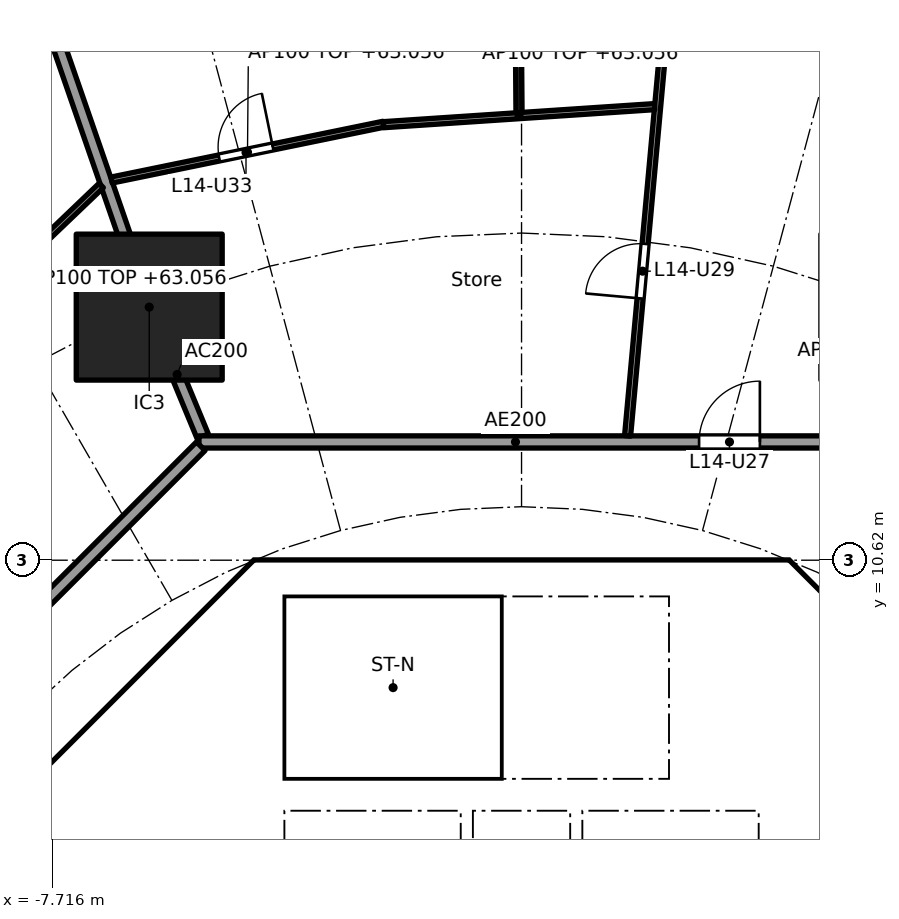
"""IFC4 building model, lengths in metres.
Left out: names, types, materials, properties, quantities, classifications, styles, units other than length and angle.
Written with IfcOpenShell. Run it as: python <this file> out.ifc"""

import sys

from ifc_helpers import new_model, si_unit, direction, frame, frame_2d, origin, origin_2d, place, context, subcontext, project, spatial, polyline, rectangle, outline, extrude, element, fill, save


model = new_model("IFC4")
c1 = context("Model", 3, precision=1e-05, world=origin(), true_north=direction((0.0, 1.0)))
c2 = subcontext(c1, "Body", "Model", "MODEL_VIEW")
j1 = project(units=[si_unit("LENGTHUNIT", "METRE"), si_unit("PLANEANGLEUNIT", "RADIAN")], contexts=[c1])
p1 = place(None, origin())
s1 = spatial("IfcSite", under=j1, at=p1, CompositionType="ELEMENT")
p2 = place(p1, origin())
s2 = spatial("IfcBuilding", under=s1, at=p2, CompositionType="ELEMENT")
p3 = place(p2, frame((0.0, 0.0, 60.3)))
s3 = spatial("IfcBuildingStorey", under=s2, at=p3, CompositionType="ELEMENT", Elevation=60.3)
p4 = place(p3, frame((-6.123, 14.782, 0.0), z_axis=(0.0, 0.0, 1.0), x_axis=(1.0, 0.0, 0.0)))
e1 = element("IfcColumn", 1, at=p4, inside=s3, PredefinedType="COLUMN", context=c2, shape_type="SweptSolid", body=[
    extrude(rectangle(XDim=2.4, YDim=2.4, at=origin_2d()), origin(), (0.0, 0.0, 1.0), 3.7),
])
p5 = place(p3, frame((9.988, 4.613, 0.0), z_axis=(0.0, 0.0, 1.0), x_axis=(-0.707106781187, 0.707106781187, 0.0)))
e2 = element("IfcWall", 2, at=p5, inside=s3, PredefinedType="SHEAR", context=c2, shape_type="SweptSolid", body=[
    extrude(rectangle(XDim=7.602, YDim=0.6, at=frame_2d((3.801, 0.0))), origin(), (0.0, 0.0, 1.0), 3.44),
])
p6 = place(p5, frame((3.201, 0.0, 0.0)))
e3 = element("IfcOpeningElement", 3, at=p6, cuts=e2, PredefinedType="OPENING", context=c2, shape_type="SweptSolid", body=[
    extrude(rectangle(XDim=1.2, YDim=2.1, at=frame_2d((0.6, 1.05))), frame((0.0, 0.31, 0.0), z_axis=(0.0, -1.0, 0.0), x_axis=(1.0, 0.0, 0.0)), (0.0, 0.0, 1.0), 0.62),
])
p7 = place(p3, frame((-4.613, 9.988, 0.0), z_axis=(0.0, 0.0, 1.0), x_axis=(-0.707106781187, -0.707106781187, 0.0)))
e4 = element("IfcWall", 4, at=p7, inside=s3, PredefinedType="SHEAR", context=c2, shape_type="SweptSolid", body=[
    extrude(rectangle(XDim=7.602, YDim=0.6, at=frame_2d((3.801, 0.0))), origin(), (0.0, 0.0, 1.0), 3.44),
])
p8 = place(p7, frame((0.351, 0.0, 0.0)))
e5 = element("IfcOpeningElement", 5, at=p8, cuts=e4, PredefinedType="OPENING", context=c2, shape_type="SweptSolid", body=[
    extrude(rectangle(XDim=1.1, YDim=2.1, at=frame_2d((0.55, 1.05))), frame((0.0, 0.31, 0.0), z_axis=(0.0, -1.0, 0.0), x_axis=(1.0, 0.0, 0.0)), (0.0, 0.0, 1.0), 0.62),
])
p9 = place(p3, frame((-5.8, 4.3, 0.0), z_axis=(0.0, 0.0, 1.0), x_axis=(0.0, 1.0, 0.0)))
e6 = element("IfcWall", 6, at=p9, inside=s3, PredefinedType="PARTITIONING", context=c2, shape_type="SweptSolid", body=[
    extrude(rectangle(XDim=3.927, YDim=0.15, at=frame_2d((1.963, 0.0))), origin(), (0.0, 0.0, 1.0), 3.44),
])
p10 = place(p9, frame((0.413, 0.0, 0.0)))
e7 = element("IfcOpeningElement", 7, at=p10, cuts=e6, PredefinedType="OPENING", context=c2, shape_type="SweptSolid", body=[
    extrude(rectangle(XDim=0.9, YDim=2.1, at=frame_2d((0.45, 1.05))), frame((0.0, 0.085, 0.0), z_axis=(0.0, -1.0, 0.0), x_axis=(1.0, 0.0, 0.0)), (0.0, 0.0, 1.0), 0.17),
])
p11 = place(p9, frame((2.489, 0.0, 0.0)))
e8 = element("IfcOpeningElement", 8, at=p11, cuts=e6, PredefinedType="OPENING", context=c2, shape_type="SweptSolid", body=[
    extrude(rectangle(XDim=0.9, YDim=2.1, at=frame_2d((0.45, 1.05))), frame((0.0, 0.085, 0.0), z_axis=(0.0, -1.0, 0.0), x_axis=(1.0, 0.0, 0.0)), (0.0, 0.0, 1.0), 0.17),
])
p12 = place(p3, frame((4.0, 4.3, 0.0), z_axis=(0.0, 0.0, 1.0), x_axis=(0.0, 1.0, 0.0)))
e9 = element("IfcWall", 9, at=p12, inside=s3, PredefinedType="SOLIDWALL", context=c2, shape_type="SweptSolid", body=[
    extrude(rectangle(XDim=2.2, YDim=0.2, at=frame_2d((1.1, 0.0))), origin(), (0.0, 0.0, 1.0), 3.44),
])
p13 = place(p12, frame((0.55, 0.0, 0.0)))
e10 = element("IfcOpeningElement", 10, at=p13, cuts=e9, PredefinedType="OPENING", context=c2, shape_type="SweptSolid", body=[
    extrude(rectangle(XDim=1.1, YDim=2.1, at=frame_2d((0.55, 1.05))), frame((0.0, 0.11, 0.0), z_axis=(0.0, -1.0, 0.0), x_axis=(1.0, 0.0, 0.0)), (0.0, 0.0, 1.0), 0.22),
])
p14 = place(p3, frame((-4.0, 4.3, 0.0), z_axis=(0.0, 0.0, 1.0), x_axis=(0.0, 1.0, 0.0)))
e11 = element("IfcWall", 11, at=p14, inside=s3, PredefinedType="SOLIDWALL", context=c2, shape_type="SweptSolid", body=[
    extrude(rectangle(XDim=2.2, YDim=0.2, at=frame_2d((1.1, 0.0))), origin(), (0.0, 0.0, 1.0), 3.44),
])
p15 = place(p14, frame((0.55, 0.0, 0.0)))
e12 = element("IfcOpeningElement", 12, at=p15, cuts=e11, PredefinedType="OPENING", context=c2, shape_type="SweptSolid", body=[
    extrude(rectangle(XDim=1.1, YDim=2.1, at=frame_2d((0.55, 1.05))), frame((0.0, 0.11, 0.0), z_axis=(0.0, -1.0, 0.0), x_axis=(1.0, 0.0, 0.0)), (0.0, 0.0, 1.0), 0.22),
])
p16 = place(p3, frame((4.0, 7.025, 0.0), z_axis=(0.0, 0.0, 1.0), x_axis=(0.0, 1.0, 0.0)))
e13 = element("IfcWall", 13, at=p16, inside=s3, PredefinedType="SOLIDWALL", context=c2, shape_type="SweptSolid", body=[
    extrude(rectangle(XDim=3.0, YDim=0.2, at=frame_2d((1.5, 0.0))), origin(), (0.0, 0.0, 1.0), 3.44),
])
p17 = place(p16, frame((0.925, 0.0, 0.0)))
e14 = element("IfcOpeningElement", 14, at=p17, cuts=e13, PredefinedType="OPENING", context=c2, shape_type="SweptSolid", body=[
    extrude(rectangle(XDim=1.1, YDim=2.1, at=frame_2d((0.55, 1.05))), frame((0.0, 0.11, 0.0), z_axis=(0.0, -1.0, 0.0), x_axis=(1.0, 0.0, 0.0)), (0.0, 0.0, 1.0), 0.22),
])
p18 = place(p3, origin())
e15 = element("IfcWall", 15, at=p18, inside=s3, PredefinedType="SHEAR", context=c2, shape_type="SweptSolid", body=[
    extrude(outline(polyline([(-4.152, 10.025), (-4.401, 9.776), (-4.825, 10.2), (-4.401, 10.625), (4.401, 10.625), (4.825, 10.2), (4.401, 9.776), (4.152, 10.025), (-4.152, 10.025)])), origin(), (0.0, 0.0, 1.0), 3.44),
])
p19 = place(p3, frame((-8.001, 6.1, 0.0), z_axis=(0.0, 0.0, 1.0), x_axis=(1.0, 0.0, 0.0)))
e16 = element("IfcWall", 16, at=p19, inside=s3, PredefinedType="PARTITIONING", context=c2, shape_type="SweptSolid", body=[
    extrude(rectangle(XDim=2.126, YDim=0.15, at=frame_2d((1.063, 0.0))), origin(), (0.0, 0.0, 1.0), 3.44),
])
for number, where, z_axis, x_axis in (
    (17, (-0.9, 4.3, 0.0), (0.0, 0.0, 1.0), (0.0, 1.0, 0.0)),
    (18, (0.9, 4.3, 0.0), (0.0, 0.0, 1.0), (0.0, 1.0, 0.0)),
):
    element("IfcWall", number, at=place(p3, frame(where, z_axis=z_axis, x_axis=x_axis)), inside=s3, PredefinedType="SOLIDWALL", context=c2, shape_type="SweptSolid", body=[
        extrude(rectangle(XDim=2.2, YDim=0.2, at=frame_2d((1.1, 0.0))), origin(), (0.0, 0.0, 1.0), 3.44),
    ])
p20 = place(p3, origin())
e19 = element("IfcWall", 19, at=p20, inside=s3, PredefinedType="SOLIDWALL", context=c2, shape_type="SweptSolid", body=[
    extrude(outline(polyline([(-3.9, 7.025), (-4.1, 7.025), (-4.1, 10.025), (-3.9, 10.025), (-3.9, 7.025)])), origin(), (0.0, 0.0, 1.0), 3.44),
])
p21 = place(p3, origin())
e20 = element("IfcWall", 20, at=p21, inside=s3, PredefinedType="SOLIDWALL", context=c2, shape_type="SweptSolid", body=[
    extrude(outline(polyline([(4.1, 6.5), (-4.1, 6.5), (-4.1, 7.025), (4.1, 7.025), (4.1, 6.5)])), origin(), (0.0, 0.0, 1.0), 3.44),
])
p22 = place(p3, frame((-5.243, 12.657, 0.0), z_axis=(0.0, 0.0, 1.0), x_axis=(-0.382668627144, 0.923885664896, 0.0)))
e21 = element("IfcWall", 21, at=p22, inside=s3, PredefinedType="PARTITIONING", context=c2, shape_type="SweptSolid", body=[
    extrude(rectangle(XDim=2.2, YDim=0.2, at=frame_2d((1.1, 0.0))), origin(), (0.0, 0.0, 1.0), 3.44),
])
p23 = place(p3, frame((-6.139, 14.829, 0.0), z_axis=(0.0, 0.0, 1.0), x_axis=(-0.327178799566, 0.944962450637, 0.0)))
e22 = element("IfcWall", 22, at=p23, inside=s3, PredefinedType="PARTITIONING", context=c2, shape_type="SweptSolid", body=[
    extrude(rectangle(XDim=13.517, YDim=0.2, at=frame_2d((6.759, 0.0))), origin(), (0.0, 0.0, 1.0), 2.756),
])
p24 = place(p3, frame((5.104, 12.565, 0.0), z_axis=(0.0, 0.0, 1.0), x_axis=(-1.0, 0.0, 0.0)))
e23 = element("IfcWall", 23, at=p24, inside=s3, PredefinedType="PARTITIONING", context=c2, shape_type="SweptSolid", body=[
    extrude(rectangle(XDim=10.409, YDim=0.2, at=frame_2d((5.205, 0.0))), origin(), (0.0, 0.0, 1.0), 3.44),
])
p25 = place(p24, frame((1.185, 0.0, 0.0)))
e24 = element("IfcOpeningElement", 24, at=p25, cuts=e23, PredefinedType="OPENING", context=c2, shape_type="SweptSolid", body=[
    extrude(rectangle(XDim=1.0, YDim=2.1, at=frame_2d((0.5, 1.05))), frame((0.0, 0.11, 0.0), z_axis=(0.0, -1.0, 0.0), x_axis=(1.0, 0.0, 0.0)), (0.0, 0.0, 1.0), 0.22),
])
p26 = place(p3, frame((-5.275, 12.494, 0.0), z_axis=(0.0, 0.0, 1.0), x_axis=(-0.707106781187, -0.707106781187, 0.0)))
e25 = element("IfcWall", 25, at=p26, inside=s3, PredefinedType="PARTITIONING", context=c2, shape_type="SweptSolid", body=[
    extrude(rectangle(XDim=10.209, YDim=0.2, at=frame_2d((5.104, 0.0))), origin(), (0.0, 0.0, 1.0), 3.44),
])
p27 = place(p3, frame((1.744, 12.664, 0.0), z_axis=(0.0, 0.0, 1.0), x_axis=(0.090893639596, 0.995860605849, 0.0)))
e26 = element("IfcWall", 26, at=p27, inside=s3, PredefinedType="PARTITIONING", context=c2, shape_type="SweptSolid", body=[
    extrude(rectangle(XDim=19.374, YDim=0.1, at=frame_2d((9.687, 0.0))), origin(), (0.0, 0.0, 1.0), 2.687),
])
p28 = place(p27, frame((2.27, 0.0, 0.0)))
e27 = element("IfcOpeningElement", 27, at=p28, cuts=e26, PredefinedType="OPENING", context=c2, shape_type="SweptSolid", body=[
    extrude(rectangle(XDim=0.9, YDim=2.1, at=frame_2d((0.45, 1.05))), frame((0.0, 0.06, 0.0), z_axis=(0.0, -1.0, 0.0), x_axis=(1.0, 0.0, 0.0)), (0.0, 0.0, 1.0), 0.12),
])
p29 = place(p27, frame((8.582, 0.0, 0.0)))
e28 = element("IfcOpeningElement", 28, at=p29, cuts=e26, PredefinedType="OPENING", context=c2, shape_type="SweptSolid", body=[
    extrude(rectangle(XDim=0.9, YDim=2.1, at=frame_2d((0.45, 1.05))), frame((0.0, 0.06, 0.0), z_axis=(0.0, -1.0, 0.0), x_axis=(1.0, 0.0, 0.0)), (0.0, 0.0, 1.0), 0.12),
])
p30 = place(p27, frame((15.548, 0.0, 0.0)))
e29 = element("IfcOpeningElement", 29, at=p30, cuts=e26, PredefinedType="OPENING", context=c2, shape_type="SweptSolid", body=[
    extrude(rectangle(XDim=0.9, YDim=2.1, at=frame_2d((0.45, 1.05))), frame((0.0, 0.06, 0.0), z_axis=(0.0, -1.0, 0.0), x_axis=(1.0, 0.0, 0.0)), (0.0, 0.0, 1.0), 0.12),
])
p31 = place(p3, frame((2.188, 18.079, 0.0), z_axis=(0.0, 0.0, 1.0), x_axis=(-0.997791437766, -0.066424744789, 0.0)))
e30 = element("IfcWall", 30, at=p31, inside=s3, PredefinedType="PARTITIONING", context=c2, shape_type="SweptSolid", body=[
    extrude(rectangle(XDim=4.469, YDim=0.1, at=frame_2d((2.235, 0.0))), origin(), (0.0, 0.0, 1.0), 2.756),
])
p32 = place(p3, frame((-0.042, 17.98, 0.0), z_axis=(0.0, 0.0, 1.0), x_axis=(-0.007692080119, 0.999970415514, 0.0)))
e31 = element("IfcWall", 31, at=p32, inside=s3, PredefinedType="PARTITIONING", context=c2, shape_type="SweptSolid", body=[
    extrude(rectangle(XDim=6.856, YDim=0.1, at=frame_2d((3.428, 0.0))), origin(), (0.0, 0.0, 1.0), 3.44),
])
p33 = place(p3, frame((-2.272, 17.789, 0.0), z_axis=(0.0, 0.0, 1.0), x_axis=(-0.979595137747, -0.200981009307, 0.0)))
e32 = element("IfcWall", 32, at=p33, inside=s3, PredefinedType="PARTITIONING", context=c2, shape_type="SweptSolid", body=[
    extrude(rectangle(XDim=4.562, YDim=0.1, at=frame_2d((2.281, 0.0))), origin(), (0.0, 0.0, 1.0), 2.756),
])
p34 = place(p33, frame((1.856, 0.0, 0.0)))
e33 = element("IfcOpeningElement", 33, at=p34, cuts=e32, PredefinedType="OPENING", context=c2, shape_type="SweptSolid", body=[
    extrude(rectangle(XDim=0.9, YDim=2.1, at=frame_2d((0.45, 1.05))), frame((0.0, 0.06, 0.0), z_axis=(0.0, -1.0, 0.0), x_axis=(1.0, 0.0, 0.0)), (0.0, 0.0, 1.0), 0.12),
])
p35 = place(p3, frame((-6.912, 16.782, 0.0), z_axis=(0.0, 0.0, 1.0), x_axis=(-0.722775679202, -0.691082713975, 0.0)))
e34 = element("IfcWall", 34, at=p35, inside=s3, PredefinedType="PARTITIONING", context=c2, shape_type="SweptSolid", body=[
    extrude(rectangle(XDim=4.437, YDim=0.1, at=frame_2d((2.219, 0.0))), origin(), (0.0, 0.0, 1.0), 2.756),
])
p36 = place(p17, origin())
e35 = element("IfcDoor", 35, at=p36, inside=s3, OperationType="SINGLE_SWING_LEFT", PredefinedType="DOOR", context=c2, shape_type="SweptSolid", body=[
    extrude(rectangle(XDim=1.1, YDim=2.1, at=frame_2d((0.55, 1.05))), frame((0.0, 0.025, 0.0), z_axis=(0.0, -1.0, 0.0), x_axis=(1.0, 0.0, 0.0)), (0.0, 0.0, 1.0), 0.05),
])
fill(e14, e35)
p37 = place(p11, origin())
e36 = element("IfcDoor", 36, at=p37, inside=s3, OperationType="SINGLE_SWING_RIGHT", PredefinedType="DOOR", context=c2, shape_type="SweptSolid", body=[
    extrude(rectangle(XDim=0.9, YDim=2.1, at=frame_2d((0.45, 1.05))), frame((0.0, 0.025, 0.0), z_axis=(0.0, -1.0, 0.0), x_axis=(1.0, 0.0, 0.0)), (0.0, 0.0, 1.0), 0.05),
])
fill(e8, e36)
p38 = place(p8, origin())
e37 = element("IfcDoor", 37, at=p38, inside=s3, OperationType="SINGLE_SWING_RIGHT", PredefinedType="DOOR", context=c2, shape_type="SweptSolid", body=[
    extrude(rectangle(XDim=1.1, YDim=2.1, at=frame_2d((0.55, 1.05))), frame((0.0, 0.025, 0.0), z_axis=(0.0, -1.0, 0.0), x_axis=(1.0, 0.0, 0.0)), (0.0, 0.0, 1.0), 0.05),
])
fill(e5, e37)
p39 = place(p25, frame((1.0, 0.0, 0.0), x_axis=(-1.0, 0.0, 0.0)))
e38 = element("IfcDoor", 38, at=p39, inside=s3, OperationType="SINGLE_SWING_RIGHT", PredefinedType="DOOR", context=c2, shape_type="SweptSolid", body=[
    extrude(rectangle(XDim=1.0, YDim=2.1, at=frame_2d((0.5, 1.05))), frame((0.0, 0.025, 0.0), z_axis=(0.0, -1.0, 0.0), x_axis=(1.0, 0.0, 0.0)), (0.0, 0.0, 1.0), 0.05),
])
fill(e24, e38)
p40 = place(p28, origin())
e39 = element("IfcDoor", 39, at=p40, inside=s3, OperationType="SINGLE_SWING_LEFT", PredefinedType="DOOR", context=c2, shape_type="SweptSolid", body=[
    extrude(rectangle(XDim=0.9, YDim=2.1, at=frame_2d((0.45, 1.05))), frame((0.0, 0.025, 0.0), z_axis=(0.0, -1.0, 0.0), x_axis=(1.0, 0.0, 0.0)), (0.0, 0.0, 1.0), 0.05),
])
fill(e27, e39)
p41 = place(p34, frame((0.9, 0.0, 0.0), x_axis=(-1.0, 0.0, 0.0)))
e40 = element("IfcDoor", 40, at=p41, inside=s3, OperationType="SINGLE_SWING_RIGHT", PredefinedType="DOOR", context=c2, shape_type="SweptSolid", body=[
    extrude(rectangle(XDim=0.9, YDim=2.1, at=frame_2d((0.45, 1.05))), frame((0.0, 0.025, 0.0), z_axis=(0.0, -1.0, 0.0), x_axis=(1.0, 0.0, 0.0)), (0.0, 0.0, 1.0), 0.05),
])
fill(e33, e40)
save(model, sys.argv[1])
